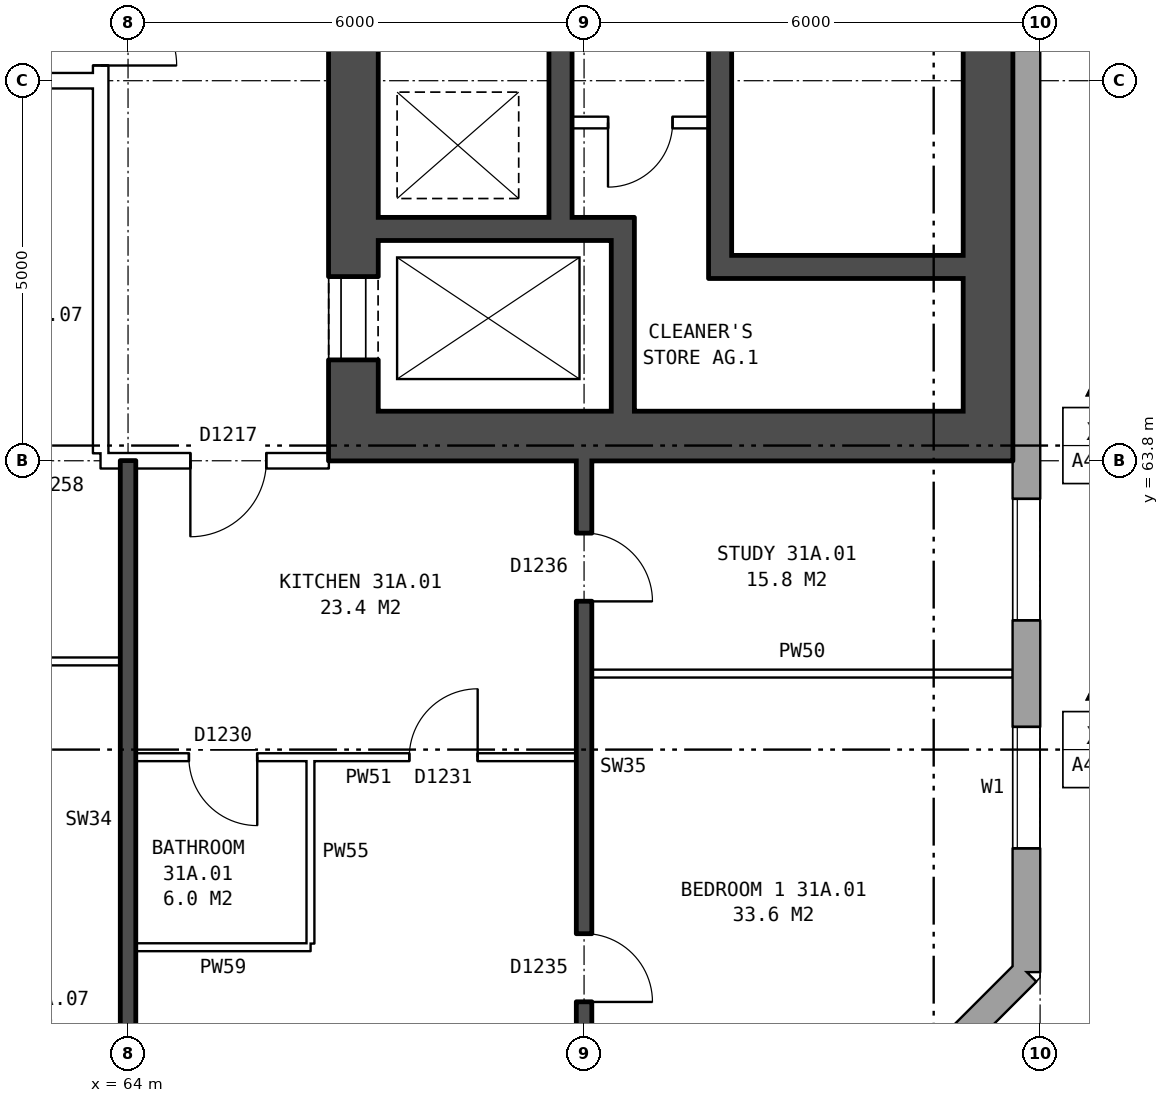
"""IFC4 building model, lengths in metres.
Left out: names, types, materials, properties, quantities, classifications, styles, units other than length and angle.
Written with IfcOpenShell. Run it as: python <this file> out.ifc"""

import sys

from ifc_helpers import new_model, si_unit, direction, frame, frame_2d, origin, place, context, subcontext, project, spatial, rectangle, extrude, element, fill, save


model = new_model("IFC4")
c1 = context("Model", 3, precision=1e-05, world=origin(), true_north=direction((0.0, 1.0)))
c2 = subcontext(c1, "Body", "Model", "MODEL_VIEW")
j1 = project(units=[si_unit("LENGTHUNIT", "METRE"), si_unit("PLANEANGLEUNIT", "RADIAN")], contexts=[c1])
p1 = place(None, origin())
s1 = spatial("IfcSite", under=j1, at=p1, CompositionType="ELEMENT")
p2 = place(p1, origin())
s2 = spatial("IfcBuilding", under=s1, at=p2, CompositionType="ELEMENT")
p3 = place(p2, frame((0.0, 0.0, 111.9)))
s3 = spatial("IfcBuildingStorey", under=s2, at=p3, CompositionType="ELEMENT", Elevation=111.9)
p4 = place(p3, frame((72.925, 54.18, 0.0), z_axis=(0.0, 0.0, 1.0), x_axis=(0.707106781187, 0.707106781187, 0.0)))
e1 = element("IfcWall", 1, at=p4, inside=s3, PredefinedType="STANDARD", context=c2, shape_type="SweptSolid", body=[
    extrude(rectangle(XDim=4.094, YDim=0.36, at=frame_2d((2.047, 0.0))), origin(), (0.0, 0.0, 1.0), 2.85),
])
p5 = place(p4, frame((1.247, 0.0, 0.8)))
e2 = element("IfcOpeningElement", 2, at=p5, cuts=e1, PredefinedType="OPENING", context=c2, shape_type="SweptSolid", body=[
    extrude(rectangle(XDim=1.6, YDim=1.8, at=frame_2d((0.8, 0.9))), frame((0.0, 0.19, 0.0), z_axis=(0.0, -1.0, 0.0), x_axis=(1.0, 0.0, 0.0)), (0.0, 0.0, 1.0), 0.38),
])
p6 = place(p3, frame((75.82, 57.075, 0.0), z_axis=(0.0, 0.0, 1.0), x_axis=(0.0, 1.0, 0.0)))
e3 = element("IfcWall", 3, at=p6, inside=s3, PredefinedType="STANDARD", context=c2, shape_type="SweptSolid", body=[
    extrude(rectangle(XDim=25.851, YDim=0.36, at=frame_2d((12.925, 0.0))), origin(), (0.0, 0.0, 1.0), 2.85),
])
p7 = place(p6, frame((1.625, 0.0, 0.8)))
e4 = element("IfcOpeningElement", 4, at=p7, cuts=e3, PredefinedType="OPENING", context=c2, shape_type="SweptSolid", body=[
    extrude(rectangle(XDim=1.6, YDim=1.8, at=frame_2d((0.8, 0.9))), frame((0.0, 0.19, 0.0), z_axis=(0.0, -1.0, 0.0), x_axis=(1.0, 0.0, 0.0)), (0.0, 0.0, 1.0), 0.38),
])
p8 = place(p6, frame((4.625, 0.0, 0.8)))
e5 = element("IfcOpeningElement", 5, at=p8, cuts=e3, PredefinedType="OPENING", context=c2, shape_type="SweptSolid", body=[
    extrude(rectangle(XDim=1.6, YDim=1.8, at=frame_2d((0.8, 0.9))), frame((0.0, 0.19, 0.0), z_axis=(0.0, -1.0, 0.0), x_axis=(1.0, 0.0, 0.0)), (0.0, 0.0, 1.0), 0.38),
])
p9 = place(p6, frame((19.625, 0.0, 0.8)))
e6 = element("IfcOpeningElement", 6, at=p9, cuts=e3, PredefinedType="OPENING", context=c2, shape_type="SweptSolid", body=[
    extrude(rectangle(XDim=1.6, YDim=1.8, at=frame_2d((0.8, 0.9))), frame((0.0, 0.19, 0.0), z_axis=(0.0, -1.0, 0.0), x_axis=(1.0, 0.0, 0.0)), (0.0, 0.0, 1.0), 0.38),
])
p10 = place(p6, frame((22.625, 0.0, 0.8)))
e7 = element("IfcOpeningElement", 7, at=p10, cuts=e3, PredefinedType="OPENING", context=c2, shape_type="SweptSolid", body=[
    extrude(rectangle(XDim=1.6, YDim=1.8, at=frame_2d((0.8, 0.9))), frame((0.0, 0.19, 0.0), z_axis=(0.0, -1.0, 0.0), x_axis=(1.0, 0.0, 0.0)), (0.0, 0.0, 1.0), 0.38),
])
p11 = place(p3, frame((66.965, 64.45, 0.0), z_axis=(0.0, 0.0, 1.0), x_axis=(0.0, 1.0, 0.0)))
e8 = element("IfcWall", 8, at=p11, inside=s3, PredefinedType="SHEAR", context=c2, shape_type="SweptSolid", body=[
    extrude(rectangle(XDim=11.1, YDim=0.65, at=frame_2d((5.55, 0.0))), origin(), (0.0, 0.0, 1.0), 2.85),
])
p12 = place(p11, frame((0.675, 0.0, 0.0)))
e9 = element("IfcOpeningElement", 9, at=p12, cuts=e8, PredefinedType="OPENING", context=c2, shape_type="SweptSolid", body=[
    extrude(rectangle(XDim=1.1, YDim=2.1, at=frame_2d((0.55, 1.05))), frame((0.0, 0.335, 0.0), z_axis=(0.0, -1.0, 0.0), x_axis=(1.0, 0.0, 0.0)), (0.0, 0.0, 1.0), 0.67),
])
p13 = place(p11, frame((9.25, 0.0, 0.0)))
e10 = element("IfcOpeningElement", 10, at=p13, cuts=e8, PredefinedType="OPENING", context=c2, shape_type="SweptSolid", body=[
    extrude(rectangle(XDim=1.1, YDim=2.1, at=frame_2d((0.55, 1.05))), frame((0.0, 0.335, 0.0), z_axis=(0.0, -1.0, 0.0), x_axis=(1.0, 0.0, 0.0)), (0.0, 0.0, 1.0), 0.67),
])
p14 = place(p3, frame((75.315, 64.45, 0.0), z_axis=(0.0, 0.0, 1.0), x_axis=(0.0, 1.0, 0.0)))
e11 = element("IfcWall", 11, at=p14, inside=s3, PredefinedType="SHEAR", context=c2, shape_type="SweptSolid", body=[
    extrude(rectangle(XDim=11.1, YDim=0.65, at=frame_2d((5.55, 0.0))), origin(), (0.0, 0.0, 1.0), 2.85),
])
p15 = place(p3, frame((66.64, 64.125, 0.0), z_axis=(0.0, 0.0, 1.0), x_axis=(1.0, 0.0, 0.0)))
e12 = element("IfcWall", 12, at=p15, inside=s3, PredefinedType="SHEAR", context=c2, shape_type="SweptSolid", body=[
    extrude(rectangle(XDim=9.0, YDim=0.65, at=frame_2d((4.5, 0.0))), origin(), (0.0, 0.0, 1.0), 2.85),
])
p16 = place(p3, frame((71.94, 66.35, 0.0), z_axis=(0.0, 0.0, 1.0), x_axis=(1.0, 0.0, 0.0)))
e13 = element("IfcWall", 13, at=p16, inside=s3, PredefinedType="SHEAR", context=c2, shape_type="SweptSolid", body=[
    extrude(rectangle(XDim=3.05, YDim=0.3, at=frame_2d((1.525, 0.0))), origin(), (0.0, 0.0, 1.0), 2.85),
])
p17 = place(p3, frame((67.29, 66.85, 0.0), z_axis=(0.0, 0.0, 1.0), x_axis=(1.0, 0.0, 0.0)))
e14 = element("IfcWall", 14, at=p17, inside=s3, PredefinedType="SHEAR", context=c2, shape_type="SweptSolid", body=[
    extrude(rectangle(XDim=3.37, YDim=0.3, at=frame_2d((1.685, 0.0))), origin(), (0.0, 0.0, 1.0), 2.85),
])
p18 = place(p3, frame((69.84, 68.25, 0.0), z_axis=(0.0, 0.0, 1.0), x_axis=(1.0, 0.0, 0.0)))
e15 = element("IfcWall", 15, at=p18, inside=s3, PredefinedType="PARTITIONING", context=c2, shape_type="SweptSolid", body=[
    extrude(rectangle(XDim=1.8, YDim=0.15, at=frame_2d((0.9, 0.0))), origin(), (0.0, 0.0, 1.0), 2.85),
])
p19 = place(p18, frame((0.475, 0.0, 0.0)))
e16 = element("IfcOpeningElement", 16, at=p19, cuts=e15, PredefinedType="OPENING", context=c2, shape_type="SweptSolid", body=[
    extrude(rectangle(XDim=0.85, YDim=2.1, at=frame_2d((0.425, 1.05))), frame((0.0, 0.085, 0.0), z_axis=(0.0, -1.0, 0.0), x_axis=(1.0, 0.0, 0.0)), (0.0, 0.0, 1.0), 0.17),
])
p20 = place(p3, frame((69.69, 67.0, 0.0), z_axis=(0.0, 0.0, 1.0), x_axis=(0.0, 1.0, 0.0)))
e17 = element("IfcWall", 17, at=p20, inside=s3, PredefinedType="SHEAR", context=c2, shape_type="SweptSolid", body=[
    extrude(rectangle(XDim=6.6, YDim=0.3, at=frame_2d((3.3, 0.0))), origin(), (0.0, 0.0, 1.0), 2.85),
])
p21 = place(p3, frame((70.51, 64.45, 0.0), z_axis=(0.0, 0.0, 1.0), x_axis=(0.0, 1.0, 0.0)))
e18 = element("IfcWall", 18, at=p21, inside=s3, PredefinedType="SHEAR", context=c2, shape_type="SweptSolid", body=[
    extrude(rectangle(XDim=2.25, YDim=0.3, at=frame_2d((1.125, 0.0))), origin(), (0.0, 0.0, 1.0), 2.85),
])
p22 = place(p3, frame((71.79, 66.2, 0.0), z_axis=(0.0, 0.0, 1.0), x_axis=(0.0, 1.0, 0.0)))
e19 = element("IfcWall", 19, at=p22, inside=s3, PredefinedType="SHEAR", context=c2, shape_type="SweptSolid", body=[
    extrude(rectangle(XDim=7.4, YDim=0.3, at=frame_2d((3.7, 0.0))), origin(), (0.0, 0.0, 1.0), 2.85),
])
p23 = place(p3, frame((63.64, 63.9, 0.0), z_axis=(0.0, 0.0, 1.0), x_axis=(0.0, 1.0, 0.0)))
e20 = element("IfcWall", 20, at=p23, inside=s3, PredefinedType="PARTITIONING", context=c2, shape_type="SweptSolid", body=[
    extrude(rectangle(XDim=12.2, YDim=0.2, at=frame_2d((6.1, 0.0))), origin(), (0.0, 0.0, 1.0), 2.85),
])
p24 = place(p23, frame((5.1, 0.0, 0.0)))
e21 = element("IfcOpeningElement", 21, at=p24, cuts=e20, PredefinedType="OPENING", context=c2, shape_type="SweptSolid", body=[
    extrude(rectangle(XDim=2.0, YDim=2.1, at=frame_2d((1.0, 1.05))), frame((0.0, 0.11, 0.0), z_axis=(0.0, -1.0, 0.0), x_axis=(1.0, 0.0, 0.0)), (0.0, 0.0, 1.0), 0.22),
])
p25 = place(p3, frame((64.1, 57.4, 0.0), z_axis=(0.0, 0.0, 1.0), x_axis=(1.0, 0.0, 0.0)))
e22 = element("IfcWall", 22, at=p25, inside=s3, PredefinedType="PARTITIONING", context=c2, shape_type="SweptSolid", body=[
    extrude(rectangle(XDim=2.3, YDim=0.1, at=frame_2d((1.15, 0.0))), origin(), (0.0, 0.0, 1.0), 2.85),
])
p26 = place(p3, frame((64.1, 59.9, 0.0), z_axis=(0.0, 0.0, 1.0), x_axis=(1.0, 0.0, 0.0)))
e23 = element("IfcWall", 23, at=p26, inside=s3, PredefinedType="PARTITIONING", context=c2, shape_type="SweptSolid", body=[
    extrude(rectangle(XDim=5.8, YDim=0.1, at=frame_2d((2.9, 0.0))), origin(), (0.0, 0.0, 1.0), 2.85),
])
p27 = place(p26, frame((3.6, 0.0, 0.0)))
e24 = element("IfcOpeningElement", 24, at=p27, cuts=e23, PredefinedType="OPENING", context=c2, shape_type="SweptSolid", body=[
    extrude(rectangle(XDim=0.9, YDim=2.1, at=frame_2d((0.45, 1.05))), frame((0.0, 0.06, 0.0), z_axis=(0.0, -1.0, 0.0), x_axis=(1.0, 0.0, 0.0)), (0.0, 0.0, 1.0), 0.12),
])
p28 = place(p26, frame((0.7, 0.0, 0.0)))
e25 = element("IfcOpeningElement", 25, at=p28, cuts=e23, PredefinedType="OPENING", context=c2, shape_type="SweptSolid", body=[
    extrude(rectangle(XDim=0.9, YDim=2.1, at=frame_2d((0.45, 1.05))), frame((0.0, 0.06, 0.0), z_axis=(0.0, -1.0, 0.0), x_axis=(1.0, 0.0, 0.0)), (0.0, 0.0, 1.0), 0.12),
])
p29 = place(p3, frame((70.1, 61.0, 0.0), z_axis=(0.0, 0.0, 1.0), x_axis=(1.0, 0.0, 0.0)))
e26 = element("IfcWall", 26, at=p29, inside=s3, PredefinedType="PARTITIONING", context=c2, shape_type="SweptSolid", body=[
    extrude(rectangle(XDim=5.54, YDim=0.1, at=frame_2d((2.77, 0.0))), origin(), (0.0, 0.0, 1.0), 2.85),
])
p30 = place(p3, frame((61.0, 61.16, 0.0), z_axis=(0.0, 0.0, 1.0), x_axis=(1.0, 0.0, 0.0)))
e27 = element("IfcWall", 27, at=p30, inside=s3, PredefinedType="PARTITIONING", context=c2, shape_type="SweptSolid", body=[
    extrude(rectangle(XDim=2.9, YDim=0.1, at=frame_2d((1.45, 0.0))), origin(), (0.0, 0.0, 1.0), 2.85),
])
p31 = place(p30, frame((1.0, 0.0, 0.0)))
e28 = element("IfcOpeningElement", 28, at=p31, cuts=e27, PredefinedType="OPENING", context=c2, shape_type="SweptSolid", body=[
    extrude(rectangle(XDim=0.9, YDim=2.1, at=frame_2d((0.45, 1.05))), frame((0.0, 0.06, 0.0), z_axis=(0.0, -1.0, 0.0), x_axis=(1.0, 0.0, 0.0)), (0.0, 0.0, 1.0), 0.12),
])
p32 = place(p3, frame((63.64, 63.8, 0.0), z_axis=(0.0, 0.0, 1.0), x_axis=(1.0, 0.0, 0.0)))
e29 = element("IfcWall", 29, at=p32, inside=s3, PredefinedType="PARTITIONING", context=c2, shape_type="SweptSolid", body=[
    extrude(rectangle(XDim=3.0, YDim=0.2, at=frame_2d((1.5, 0.0))), origin(), (0.0, 0.0, 1.0), 2.85),
])
p33 = place(p32, frame((1.18, 0.0, 0.0)))
e30 = element("IfcOpeningElement", 30, at=p33, cuts=e29, PredefinedType="OPENING", context=c2, shape_type="SweptSolid", body=[
    extrude(rectangle(XDim=1.0, YDim=2.1, at=frame_2d((0.5, 1.05))), frame((0.0, 0.11, 0.0), z_axis=(0.0, -1.0, 0.0), x_axis=(1.0, 0.0, 0.0)), (0.0, 0.0, 1.0), 0.22),
])
p34 = place(p3, frame((44.36, 68.8, 0.0), z_axis=(0.0, 0.0, 1.0), x_axis=(1.0, 0.0, 0.0)))
e31 = element("IfcWall", 31, at=p34, inside=s3, PredefinedType="PARTITIONING", context=c2, shape_type="SweptSolid", body=[
    extrude(rectangle(XDim=19.28, YDim=0.2, at=frame_2d((9.64, 0.0))), origin(), (0.0, 0.0, 1.0), 2.85),
])
p35 = place(p34, frame((17.46, 0.0, 0.0)))
e32 = element("IfcOpeningElement", 32, at=p35, cuts=e31, PredefinedType="OPENING", context=c2, shape_type="SweptSolid", body=[
    extrude(rectangle(XDim=1.0, YDim=2.1, at=frame_2d((0.5, 1.05))), frame((0.0, 0.11, 0.0), z_axis=(0.0, -1.0, 0.0), x_axis=(1.0, 0.0, 0.0)), (0.0, 0.0, 1.0), 0.22),
])
p36 = place(p34, frame((11.64, 0.0, 0.0)))
e33 = element("IfcOpeningElement", 33, at=p36, cuts=e31, PredefinedType="OPENING", context=c2, shape_type="SweptSolid", body=[
    extrude(rectangle(XDim=1.0, YDim=2.1, at=frame_2d((0.5, 1.05))), frame((0.0, 0.11, 0.0), z_axis=(0.0, -1.0, 0.0), x_axis=(1.0, 0.0, 0.0)), (0.0, 0.0, 1.0), 0.22),
])
p37 = place(p34, frame((2.64, 0.0, 0.0)))
e34 = element("IfcOpeningElement", 34, at=p37, cuts=e31, PredefinedType="OPENING", context=c2, shape_type="SweptSolid", body=[
    extrude(rectangle(XDim=1.0, YDim=2.1, at=frame_2d((0.5, 1.05))), frame((0.0, 0.11, 0.0), z_axis=(0.0, -1.0, 0.0), x_axis=(1.0, 0.0, 0.0)), (0.0, 0.0, 1.0), 0.22),
])
p38 = place(p3, frame((64.0, 54.36, 0.0), z_axis=(0.0, 0.0, 1.0), x_axis=(0.0, 1.0, 0.0)))
e35 = element("IfcWall", 35, at=p38, inside=s3, PredefinedType="SOLIDWALL", context=c2, shape_type="SweptSolid", body=[
    extrude(rectangle(XDim=9.44, YDim=0.2, at=frame_2d((4.72, 0.0))), origin(), (0.0, 0.0, 1.0), 2.85),
])
p39 = place(p3, frame((66.4, 57.45, 0.0), z_axis=(0.0, 0.0, 1.0), x_axis=(0.0, 1.0, 0.0)))
e36 = element("IfcWall", 36, at=p39, inside=s3, PredefinedType="PARTITIONING", context=c2, shape_type="SweptSolid", body=[
    extrude(rectangle(XDim=2.4, YDim=0.1, at=frame_2d((1.2, 0.0))), origin(), (0.0, 0.0, 1.0), 2.85),
])
p40 = place(p3, frame((70.0, 54.36, 0.0), z_axis=(0.0, 0.0, 1.0), x_axis=(0.0, 1.0, 0.0)))
e37 = element("IfcWall", 37, at=p40, inside=s3, PredefinedType="SOLIDWALL", context=c2, shape_type="SweptSolid", body=[
    extrude(rectangle(XDim=9.44, YDim=0.2, at=frame_2d((4.72, 0.0))), origin(), (0.0, 0.0, 1.0), 2.85),
])
p41 = place(p40, frame((2.32, 0.0, 0.0)))
e38 = element("IfcOpeningElement", 38, at=p41, cuts=e37, PredefinedType="OPENING", context=c2, shape_type="SweptSolid", body=[
    extrude(rectangle(XDim=0.9, YDim=2.1, at=frame_2d((0.45, 1.05))), frame((0.0, 0.11, 0.0), z_axis=(0.0, -1.0, 0.0), x_axis=(1.0, 0.0, 0.0)), (0.0, 0.0, 1.0), 0.22),
])
p42 = place(p40, frame((7.59, 0.0, 0.0)))
e39 = element("IfcOpeningElement", 39, at=p42, cuts=e37, PredefinedType="OPENING", context=c2, shape_type="SweptSolid", body=[
    extrude(rectangle(XDim=0.9, YDim=2.1, at=frame_2d((0.45, 1.05))), frame((0.0, 0.11, 0.0), z_axis=(0.0, -1.0, 0.0), x_axis=(1.0, 0.0, 0.0)), (0.0, 0.0, 1.0), 0.22),
])
p43 = place(p7, origin())
e40 = element("IfcWindow", 40, at=p43, inside=s3, PartitioningType="SINGLE_PANEL", PredefinedType="WINDOW", context=c2, shape_type="SweptSolid", body=[
    extrude(rectangle(XDim=1.6, YDim=1.8, at=frame_2d((0.8, 0.9))), frame((0.0, 0.15, 0.0), z_axis=(0.0, -1.0, 0.0), x_axis=(1.0, 0.0, 0.0)), (0.0, 0.0, 1.0), 0.06),
])
fill(e4, e40)
p44 = place(p8, origin())
e41 = element("IfcWindow", 41, at=p44, inside=s3, PartitioningType="SINGLE_PANEL", PredefinedType="WINDOW", context=c2, shape_type="SweptSolid", body=[
    extrude(rectangle(XDim=1.6, YDim=1.8, at=frame_2d((0.8, 0.9))), frame((0.0, 0.15, 0.0), z_axis=(0.0, -1.0, 0.0), x_axis=(1.0, 0.0, 0.0)), (0.0, 0.0, 1.0), 0.06),
])
fill(e5, e41)
p45 = place(p12, origin())
e42 = element("IfcDoor", 42, at=p45, inside=s3, OperationType="DOUBLE_DOOR_SLIDING", PredefinedType="DOOR", context=c2, shape_type="SweptSolid", body=[
    extrude(rectangle(XDim=1.1, YDim=2.1, at=frame_2d((0.55, 1.05))), frame((0.0, -0.26, 0.0), z_axis=(0.0, -1.0, 0.0), x_axis=(1.0, 0.0, 0.0)), (0.0, 0.0, 1.0), 0.05),
])
fill(e9, e42)
p46 = place(p19, frame((0.85, 0.0, 0.0), z_axis=(0.0, 0.0, 1.0), x_axis=(-1.0, 0.0, 0.0)))
e43 = element("IfcDoor", 43, at=p46, inside=s3, OperationType="SINGLE_SWING_RIGHT", PredefinedType="DOOR", context=c2, shape_type="SweptSolid", body=[
    extrude(rectangle(XDim=0.85, YDim=2.1, at=frame_2d((0.425, 1.05))), frame((0.0, 0.025, 0.0), z_axis=(0.0, -1.0, 0.0), x_axis=(1.0, 0.0, 0.0)), (0.0, 0.0, 1.0), 0.05),
])
fill(e16, e43)
p47 = place(p24, frame((2.0, 0.0, 0.0), z_axis=(0.0, 0.0, 1.0), x_axis=(-1.0, 0.0, 0.0)))
e44 = element("IfcDoor", 44, at=p47, inside=s3, OperationType="DOUBLE_DOOR_SINGLE_SWING", PredefinedType="DOOR", context=c2, shape_type="SweptSolid", body=[
    extrude(rectangle(XDim=2.0, YDim=2.1, at=frame_2d((1.0, 1.05))), frame((0.0, 0.025, 0.0), z_axis=(0.0, -1.0, 0.0), x_axis=(1.0, 0.0, 0.0)), (0.0, 0.0, 1.0), 0.05),
])
fill(e21, e44)
p48 = place(p41, frame((0.9, 0.0, 0.0), z_axis=(0.0, 0.0, 1.0), x_axis=(-1.0, 0.0, 0.0)))
e45 = element("IfcDoor", 45, at=p48, inside=s3, OperationType="SINGLE_SWING_RIGHT", PredefinedType="DOOR", context=c2, shape_type="SweptSolid", body=[
    extrude(rectangle(XDim=0.9, YDim=2.1, at=frame_2d((0.45, 1.05))), frame((0.0, 0.025, 0.0), z_axis=(0.0, -1.0, 0.0), x_axis=(1.0, 0.0, 0.0)), (0.0, 0.0, 1.0), 0.05),
])
fill(e38, e45)
p49 = place(p42, frame((0.9, 0.0, 0.0), z_axis=(0.0, 0.0, 1.0), x_axis=(-1.0, 0.0, 0.0)))
e46 = element("IfcDoor", 46, at=p49, inside=s3, OperationType="SINGLE_SWING_RIGHT", PredefinedType="DOOR", context=c2, shape_type="SweptSolid", body=[
    extrude(rectangle(XDim=0.9, YDim=2.1, at=frame_2d((0.45, 1.05))), frame((0.0, 0.025, 0.0), z_axis=(0.0, -1.0, 0.0), x_axis=(1.0, 0.0, 0.0)), (0.0, 0.0, 1.0), 0.05),
])
fill(e39, e46)
p50 = place(p33, frame((1.0, 0.0, 0.0), z_axis=(0.0, 0.0, 1.0), x_axis=(-1.0, 0.0, 0.0)))
e47 = element("IfcDoor", 47, at=p50, inside=s3, OperationType="SINGLE_SWING_RIGHT", PredefinedType="DOOR", context=c2, shape_type="SweptSolid", body=[
    extrude(rectangle(XDim=1.0, YDim=2.1, at=frame_2d((0.5, 1.05))), frame((0.0, 0.025, 0.0), z_axis=(0.0, -1.0, 0.0), x_axis=(1.0, 0.0, 0.0)), (0.0, 0.0, 1.0), 0.05),
])
fill(e30, e47)
p51 = place(p27, origin())
e48 = element("IfcDoor", 48, at=p51, inside=s3, OperationType="SINGLE_SWING_RIGHT", PredefinedType="DOOR", context=c2, shape_type="SweptSolid", body=[
    extrude(rectangle(XDim=0.9, YDim=2.1, at=frame_2d((0.45, 1.05))), frame((0.0, 0.025, 0.0), z_axis=(0.0, -1.0, 0.0), x_axis=(1.0, 0.0, 0.0)), (0.0, 0.0, 1.0), 0.05),
])
fill(e24, e48)
p52 = place(p28, frame((0.9, 0.0, 0.0), z_axis=(0.0, 0.0, 1.0), x_axis=(-1.0, 0.0, 0.0)))
e49 = element("IfcDoor", 49, at=p52, inside=s3, OperationType="SINGLE_SWING_LEFT", PredefinedType="DOOR", context=c2, shape_type="SweptSolid", body=[
    extrude(rectangle(XDim=0.9, YDim=2.1, at=frame_2d((0.45, 1.05))), frame((0.0, 0.025, 0.0), z_axis=(0.0, -1.0, 0.0), x_axis=(1.0, 0.0, 0.0)), (0.0, 0.0, 1.0), 0.05),
])
fill(e25, e49)
save(model, sys.argv[1])
